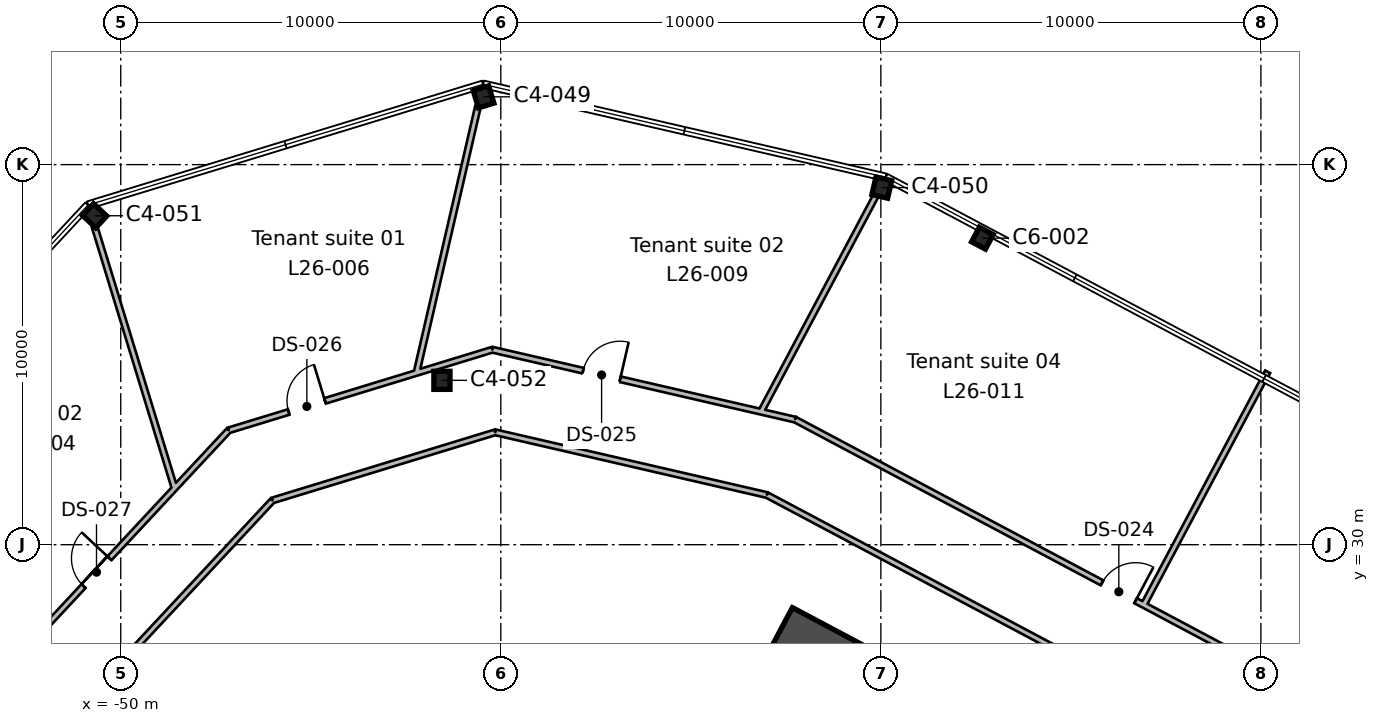
"""IFC4 building model, lengths in metres.
Left out: names, types, materials, properties, quantities, classifications, styles, units other than length and angle.
Written with IfcOpenShell. Run it as: python <this file> out.ifc"""

import sys

from ifc_helpers import new_model, si_unit, direction, frame, frame_2d, origin, origin_2d, place, context, subcontext, project, spatial, rectangle, i_section, extrude, element, fill, save


model = new_model("IFC4")
c1 = context("Model", 3, precision=1e-05, world=origin(), true_north=direction((0.0, 1.0)))
c2 = subcontext(c1, "Body", "Model", "MODEL_VIEW")
j1 = project(units=[si_unit("LENGTHUNIT", "METRE"), si_unit("PLANEANGLEUNIT", "RADIAN")], contexts=[c1])
p1 = place(None, origin())
s1 = spatial("IfcSite", under=j1, at=p1, CompositionType="ELEMENT")
p2 = place(p1, origin())
s2 = spatial("IfcBuilding", under=s1, at=p2, CompositionType="ELEMENT")
p3 = place(p2, frame((0.0, 0.0, 130.2)))
s3 = spatial("IfcBuildingStorey", under=s2, at=p3, CompositionType="ELEMENT", Elevation=130.2)
p4 = place(p3, frame((-41.549, 34.324, 0.0), z_axis=(0.0, 0.0, 1.0), x_axis=(1.0, 0.0, 0.0)))
e1 = element("IfcColumn", 1, at=p4, inside=s3, PredefinedType="COLUMN", context=c2, shape_type="SweptSolid", body=[
    extrude(i_section(OverallWidth=0.424, OverallDepth=0.475, WebThickness=0.048, FlangeThickness=0.077, FilletRadius=0.015, at=origin_2d()), origin(), (0.0, 0.0, 1.0), 4.0),
])
p5 = place(p3, frame((-27.328, 38.065, 0.0), z_axis=(0.0, 0.0, 1.0), x_axis=(-0.882947592859, 0.469471562786, 0.0)))
e2 = element("IfcColumn", 2, at=p5, inside=s3, PredefinedType="COLUMN", context=c2, shape_type="SweptSolid", body=[
    extrude(i_section(OverallWidth=0.412, OverallDepth=0.434, WebThickness=0.036, FlangeThickness=0.057, FilletRadius=0.015, at=origin_2d()), origin(), (0.0, 0.0, 1.0), 4.0),
])
for number, where, z_axis, x_axis in (
    (3, (-50.686, 38.655, 0.0), (0.0, 0.0, 1.0), (-0.682, -0.731, 0.0)),
    (4, (-29.975, 39.396, 0.0), (0.0, 0.0, 1.0), (-0.974, 0.225, 0.0)),
    (5, (-40.454, 41.784, 0.0), (0.0, 0.0, 1.0), (-0.956, -0.292, 0.0)),
):
    element("IfcColumn", number, at=place(p3, frame(where, z_axis=z_axis, x_axis=x_axis)), inside=s3, PredefinedType="COLUMN", context=c2, shape_type="SweptSolid", body=[
        extrude(i_section(OverallWidth=0.424, OverallDepth=0.475, WebThickness=0.048, FlangeThickness=0.077, FilletRadius=0.015, at=origin_2d()), origin(), (0.0, 0.0, 1.0), 4.0),
    ])
p6 = place(p3, frame((-31.996, 28.168, 0.0), z_axis=(0.0, 0.0, 1.0), x_axis=(-0.469479580143, -0.882943329908, 0.0)))
e6 = element("IfcWall", 6, at=p6, inside=s3, PredefinedType="SHEAR", context=c2, shape_type="SweptSolid", body=[
    extrude(rectangle(XDim=19.7, YDim=0.75, at=frame_2d((9.85, 0.0))), origin(), (0.0, 0.0, 1.0), 4.0),
])
p7 = place(p6, frame((10.45, 0.0, 0.0)))
e7 = element("IfcOpeningElement", 7, at=p7, cuts=e6, PredefinedType="OPENING", context=c2, shape_type="SweptSolid", body=[
    extrude(rectangle(XDim=2.4, YDim=2.4, at=frame_2d((1.2, 1.2))), frame((0.0, 0.385, 0.0), z_axis=(0.0, -1.0, 0.0), x_axis=(1.0, 0.0, 0.0)), (0.0, 0.0, 1.0), 0.77),
])
p8 = place(p3, frame((-14.005, 18.178, 0.0), z_axis=(0.0, 0.0, 1.0), x_axis=(-0.88295010195, 0.469466843842, 0.0)))
e8 = element("IfcWall", 8, at=p8, inside=s3, PredefinedType="SHEAR", context=c2, shape_type="SweptSolid", body=[
    extrude(rectangle(XDim=20.2, YDim=0.75, at=frame_2d((10.1, 0.0))), origin(), (0.0, 0.0, 1.0), 4.0),
])
p9 = place(p3, frame((-52.104, 27.704, 0.0), z_axis=(0.0, 0.0, 1.0), x_axis=(0.681907306721, 0.731438599638, 0.0)))
e9 = element("IfcWall", 9, at=p9, inside=s3, PredefinedType="PARTITIONING", context=c2, shape_type="SweptSolid", body=[
    extrude(rectangle(XDim=4.298, YDim=0.15, at=frame_2d((2.149, 0.0))), origin(), (0.0, 0.0, 1.0), 3.64),
])
p10 = place(p9, frame((1.65, 0.0, 0.0)))
e10 = element("IfcOpeningElement", 10, at=p10, cuts=e9, PredefinedType="OPENING", context=c2, shape_type="SweptSolid", body=[
    extrude(rectangle(XDim=1.0, YDim=2.1, at=frame_2d((0.5, 1.05))), frame((0.0, 0.085, 0.0), z_axis=(0.0, -1.0, 0.0), x_axis=(1.0, 0.0, 0.0)), (0.0, 0.0, 1.0), 0.17),
])
p11 = place(p3, frame((-50.688, 38.366, 0.0), z_axis=(0.0, 0.0, 1.0), x_axis=(0.292536448014, -0.956254373367, 0.0)))
e11 = element("IfcWall", 11, at=p11, inside=s3, PredefinedType="PARTITIONING", context=c2, shape_type="SweptSolid", body=[
    extrude(rectangle(XDim=7.199, YDim=0.15, at=frame_2d((3.6, 0.0))), origin(), (0.0, 0.0, 1.0), 3.64),
])
p12 = place(p3, frame((-49.173, 30.848, 0.0), z_axis=(0.0, 0.0, 1.0), x_axis=(0.681529523193, 0.73179061829, 0.0)))
e12 = element("IfcWall", 12, at=p12, inside=s3, PredefinedType="PARTITIONING", context=c2, shape_type="SweptSolid", body=[
    extrude(rectangle(XDim=0.894, YDim=0.15, at=frame_2d((0.447, 0.0))), origin(), (0.0, 0.0, 1.0), 3.64),
])
p13 = place(p3, frame((-43.047, 34.266, 0.0), z_axis=(0.0, 0.0, 1.0), x_axis=(-0.95628717933, -0.292429189118, 0.0)))
e13 = element("IfcWall", 13, at=p13, inside=s3, PredefinedType="PARTITIONING", context=c2, shape_type="SweptSolid", body=[
    extrude(rectangle(XDim=4.299, YDim=0.15, at=frame_2d((2.149, 0.0))), origin(), (0.0, 0.0, 1.0), 3.64),
])
p14 = place(p13, frame((1.65, 0.0, 0.0)))
e14 = element("IfcOpeningElement", 14, at=p14, cuts=e13, PredefinedType="OPENING", context=c2, shape_type="SweptSolid", body=[
    extrude(rectangle(XDim=1.0, YDim=2.1, at=frame_2d((0.5, 1.05))), frame((0.0, 0.085, 0.0), z_axis=(0.0, -1.0, 0.0), x_axis=(1.0, 0.0, 0.0)), (0.0, 0.0, 1.0), 0.17),
])
p15 = place(p3, frame((-47.158, 33.009, 0.0), z_axis=(0.0, 0.0, 1.0), x_axis=(-0.682162081417, -0.731200994719, 0.0)))
e15 = element("IfcWall", 15, at=p15, inside=s3, PredefinedType="PARTITIONING", context=c2, shape_type="SweptSolid", body=[
    extrude(rectangle(XDim=2.061, YDim=0.15, at=frame_2d((1.031, 0.0))), origin(), (0.0, 0.0, 1.0), 3.64),
])
p16 = place(p3, frame((-50.185, 26.684, 0.0), z_axis=(0.0, 0.0, 1.0), x_axis=(0.682032845108, 0.731321542274, 0.0)))
e16 = element("IfcWall", 16, at=p16, inside=s3, PredefinedType="PARTITIONING", context=c2, shape_type="SweptSolid", body=[
    extrude(rectangle(XDim=6.127, YDim=0.15, at=frame_2d((3.063, 0.0))), origin(), (0.0, 0.0, 1.0), 3.64),
])
p17 = place(p3, frame((-46.006, 31.165, 0.0), z_axis=(0.0, 0.0, 1.0), x_axis=(0.95628752803, 0.292428048816, 0.0)))
e17 = element("IfcWall", 17, at=p17, inside=s3, PredefinedType="PARTITIONING", context=c2, shape_type="SweptSolid", body=[
    extrude(rectangle(XDim=6.128, YDim=0.15, at=frame_2d((3.064, 0.0))), origin(), (0.0, 0.0, 1.0), 3.64),
])
p18 = place(p3, frame((-40.146, 32.957, 0.0), z_axis=(0.0, 0.0, 1.0), x_axis=(0.974359206281, -0.224998082516, 0.0)))
e18 = element("IfcWall", 18, at=p18, inside=s3, PredefinedType="PARTITIONING", context=c2, shape_type="SweptSolid", body=[
    extrude(rectangle(XDim=7.334, YDim=0.15, at=frame_2d((3.667, 0.0))), origin(), (0.0, 0.0, 1.0), 3.64),
])
p19 = place(p3, frame((-33.0, 31.307, 0.0), z_axis=(0.0, 0.0, 1.0), x_axis=(0.882966008295, -0.469436926748, 0.0)))
e19 = element("IfcWall", 19, at=p19, inside=s3, PredefinedType="PARTITIONING", context=c2, shape_type="SweptSolid", body=[
    extrude(rectangle(XDim=12.144, YDim=0.15, at=frame_2d((6.072, 0.0))), origin(), (0.0, 0.0, 1.0), 3.64),
])
p20 = place(p3, frame((-43.047, 34.266, 0.0), z_axis=(0.0, 0.0, 1.0), x_axis=(0.956338836107, 0.292260210348, 0.0)))
e20 = element("IfcWall", 20, at=p20, inside=s3, PredefinedType="PARTITIONING", context=c2, shape_type="SweptSolid", body=[
    extrude(rectangle(XDim=0.893, YDim=0.15, at=frame_2d((0.447, 0.0))), origin(), (0.0, 0.0, 1.0), 3.64),
])
p21 = place(p3, frame((-40.599, 41.534, 0.0), z_axis=(0.0, 0.0, 1.0), x_axis=(-0.224998195806, -0.97435918012, 0.0)))
e21 = element("IfcWall", 21, at=p21, inside=s3, PredefinedType="PARTITIONING", context=c2, shape_type="SweptSolid", body=[
    extrude(rectangle(XDim=7.199, YDim=0.15, at=frame_2d((3.6, 0.0))), origin(), (0.0, 0.0, 1.0), 3.64),
])
p22 = place(p3, frame((-40.221, 35.13, 0.0), z_axis=(0.0, 0.0, 1.0), x_axis=(-0.956327673293, -0.292296735004, 0.0)))
e22 = element("IfcWall", 22, at=p22, inside=s3, PredefinedType="PARTITIONING", context=c2, shape_type="SweptSolid", body=[
    extrude(rectangle(XDim=2.062, YDim=0.15, at=frame_2d((1.031, 0.0))), origin(), (0.0, 0.0, 1.0), 3.64),
])
p23 = place(p3, frame((-40.222, 35.13, 0.0), z_axis=(0.0, 0.0, 1.0), x_axis=(0.974339831562, -0.225081968694, 0.0)))
e23 = element("IfcWall", 23, at=p23, inside=s3, PredefinedType="PARTITIONING", context=c2, shape_type="SweptSolid", body=[
    extrude(rectangle(XDim=5.931, YDim=0.15, at=frame_2d((2.965, 0.0))), origin(), (0.0, 0.0, 1.0), 3.64),
])
p24 = place(p23, frame((2.45, 0.0, 0.0)))
e24 = element("IfcOpeningElement", 24, at=p24, cuts=e23, PredefinedType="OPENING", context=c2, shape_type="SweptSolid", body=[
    extrude(rectangle(XDim=1.0, YDim=2.1, at=frame_2d((0.5, 1.05))), frame((0.0, 0.085, 0.0), z_axis=(0.0, -1.0, 0.0), x_axis=(1.0, 0.0, 0.0)), (0.0, 0.0, 1.0), 0.17),
])
p25 = place(p3, frame((-34.443, 33.795, 0.0), z_axis=(0.0, 0.0, 1.0), x_axis=(0.97454926733, -0.224173427388, 0.0)))
e25 = element("IfcWall", 25, at=p25, inside=s3, PredefinedType="PARTITIONING", context=c2, shape_type="SweptSolid", body=[
    extrude(rectangle(XDim=1.352, YDim=0.15, at=frame_2d((0.676, 0.0))), origin(), (0.0, 0.0, 1.0), 3.64),
])
p26 = place(p3, frame((-30.129, 39.188, 0.0), z_axis=(0.0, 0.0, 1.0), x_axis=(-0.469441435839, -0.882963610981, 0.0)))
e26 = element("IfcWall", 26, at=p26, inside=s3, PredefinedType="PARTITIONING", context=c2, shape_type="SweptSolid", body=[
    extrude(rectangle(XDim=6.444, YDim=0.15, at=frame_2d((3.222, 0.0))), origin(), (0.0, 0.0, 1.0), 3.64),
])
p27 = place(p3, frame((-32.258, 33.291, 0.0), z_axis=(0.0, 0.0, 1.0), x_axis=(-0.974233920413, 0.225539948383, 0.0)))
e27 = element("IfcWall", 27, at=p27, inside=s3, PredefinedType="PARTITIONING", context=c2, shape_type="SweptSolid", body=[
    extrude(rectangle(XDim=0.891, YDim=0.15, at=frame_2d((0.445, 0.0))), origin(), (0.0, 0.0, 1.0), 3.64),
])
p28 = place(p3, frame((-19.822, 34.55, 0.0), z_axis=(0.0, 0.0, 1.0), x_axis=(-0.469455680488, -0.882956037443, 0.0)))
e28 = element("IfcWall", 28, at=p28, inside=s3, PredefinedType="PARTITIONING", context=c2, shape_type="SweptSolid", body=[
    extrude(rectangle(XDim=6.95, YDim=0.15, at=frame_2d((3.475, 0.0))), origin(), (0.0, 0.0, 1.0), 3.64),
])
p29 = place(p3, frame((-32.258, 33.291, 0.0), z_axis=(0.0, 0.0, 1.0), x_axis=(0.882945475173, -0.469475545552, 0.0)))
e29 = element("IfcWall", 29, at=p29, inside=s3, PredefinedType="PARTITIONING", context=c2, shape_type="SweptSolid", body=[
    extrude(rectangle(XDim=36.535, YDim=0.15, at=frame_2d((18.267, 0.0))), origin(), (0.0, 0.0, 1.0), 3.64),
])
p30 = place(p29, frame((33.15, 0.0, 0.0)))
e30 = element("IfcOpeningElement", 30, at=p30, cuts=e29, PredefinedType="OPENING", context=c2, shape_type="SweptSolid", body=[
    extrude(rectangle(XDim=1.0, YDim=2.1, at=frame_2d((0.5, 1.05))), frame((0.0, 0.085, 0.0), z_axis=(0.0, -1.0, 0.0), x_axis=(1.0, 0.0, 0.0)), (0.0, 0.0, 1.0), 0.17),
])
p31 = place(p29, frame((17.75, 0.0, 0.0)))
e31 = element("IfcOpeningElement", 31, at=p31, cuts=e29, PredefinedType="OPENING", context=c2, shape_type="SweptSolid", body=[
    extrude(rectangle(XDim=1.0, YDim=2.1, at=frame_2d((0.5, 1.05))), frame((0.0, 0.085, 0.0), z_axis=(0.0, -1.0, 0.0), x_axis=(1.0, 0.0, 0.0)), (0.0, 0.0, 1.0), 0.17),
])
p32 = place(p29, frame((9.149, 0.0, 0.0)))
e32 = element("IfcOpeningElement", 32, at=p32, cuts=e29, PredefinedType="OPENING", context=c2, shape_type="SweptSolid", body=[
    extrude(rectangle(XDim=1.0, YDim=2.1, at=frame_2d((0.5, 1.05))), frame((0.0, 0.085, 0.0), z_axis=(0.0, -1.0, 0.0), x_axis=(1.0, 0.0, 0.0)), (0.0, 0.0, 1.0), 0.17),
])
p33 = place(p32, origin())
e33 = element("IfcDoor", 33, at=p33, inside=s3, OperationType="SINGLE_SWING_RIGHT", PredefinedType="DOOR", context=c2, shape_type="SweptSolid", body=[
    extrude(rectangle(XDim=1.0, YDim=2.1, at=frame_2d((0.5, 1.05))), frame((0.0, 0.025, 0.0), z_axis=(0.0, -1.0, 0.0), x_axis=(1.0, 0.0, 0.0)), (0.0, 0.0, 1.0), 0.05),
])
fill(e32, e33)
p34 = place(p24, origin())
e34 = element("IfcDoor", 34, at=p34, inside=s3, OperationType="SINGLE_SWING_RIGHT", PredefinedType="DOOR", context=c2, shape_type="SweptSolid", body=[
    extrude(rectangle(XDim=1.0, YDim=2.1, at=frame_2d((0.5, 1.05))), frame((0.0, 0.025, 0.0), z_axis=(0.0, -1.0, 0.0), x_axis=(1.0, 0.0, 0.0)), (0.0, 0.0, 1.0), 0.05),
])
fill(e24, e34)
p35 = place(p14, frame((1.0, 0.0, 0.0), z_axis=(0.0, 0.0, 1.0), x_axis=(-1.0, 0.0, 0.0)))
e35 = element("IfcDoor", 35, at=p35, inside=s3, OperationType="SINGLE_SWING_RIGHT", PredefinedType="DOOR", context=c2, shape_type="SweptSolid", body=[
    extrude(rectangle(XDim=1.0, YDim=2.1, at=frame_2d((0.5, 1.05))), frame((0.0, 0.025, 0.0), z_axis=(0.0, -1.0, 0.0), x_axis=(1.0, 0.0, 0.0)), (0.0, 0.0, 1.0), 0.05),
])
fill(e14, e35)
p36 = place(p10, origin())
e36 = element("IfcDoor", 36, at=p36, inside=s3, OperationType="SINGLE_SWING_RIGHT", PredefinedType="DOOR", context=c2, shape_type="SweptSolid", body=[
    extrude(rectangle(XDim=1.0, YDim=2.1, at=frame_2d((0.5, 1.05))), frame((0.0, 0.025, 0.0), z_axis=(0.0, -1.0, 0.0), x_axis=(1.0, 0.0, 0.0)), (0.0, 0.0, 1.0), 0.05),
])
fill(e10, e36)
save(model, sys.argv[1])
